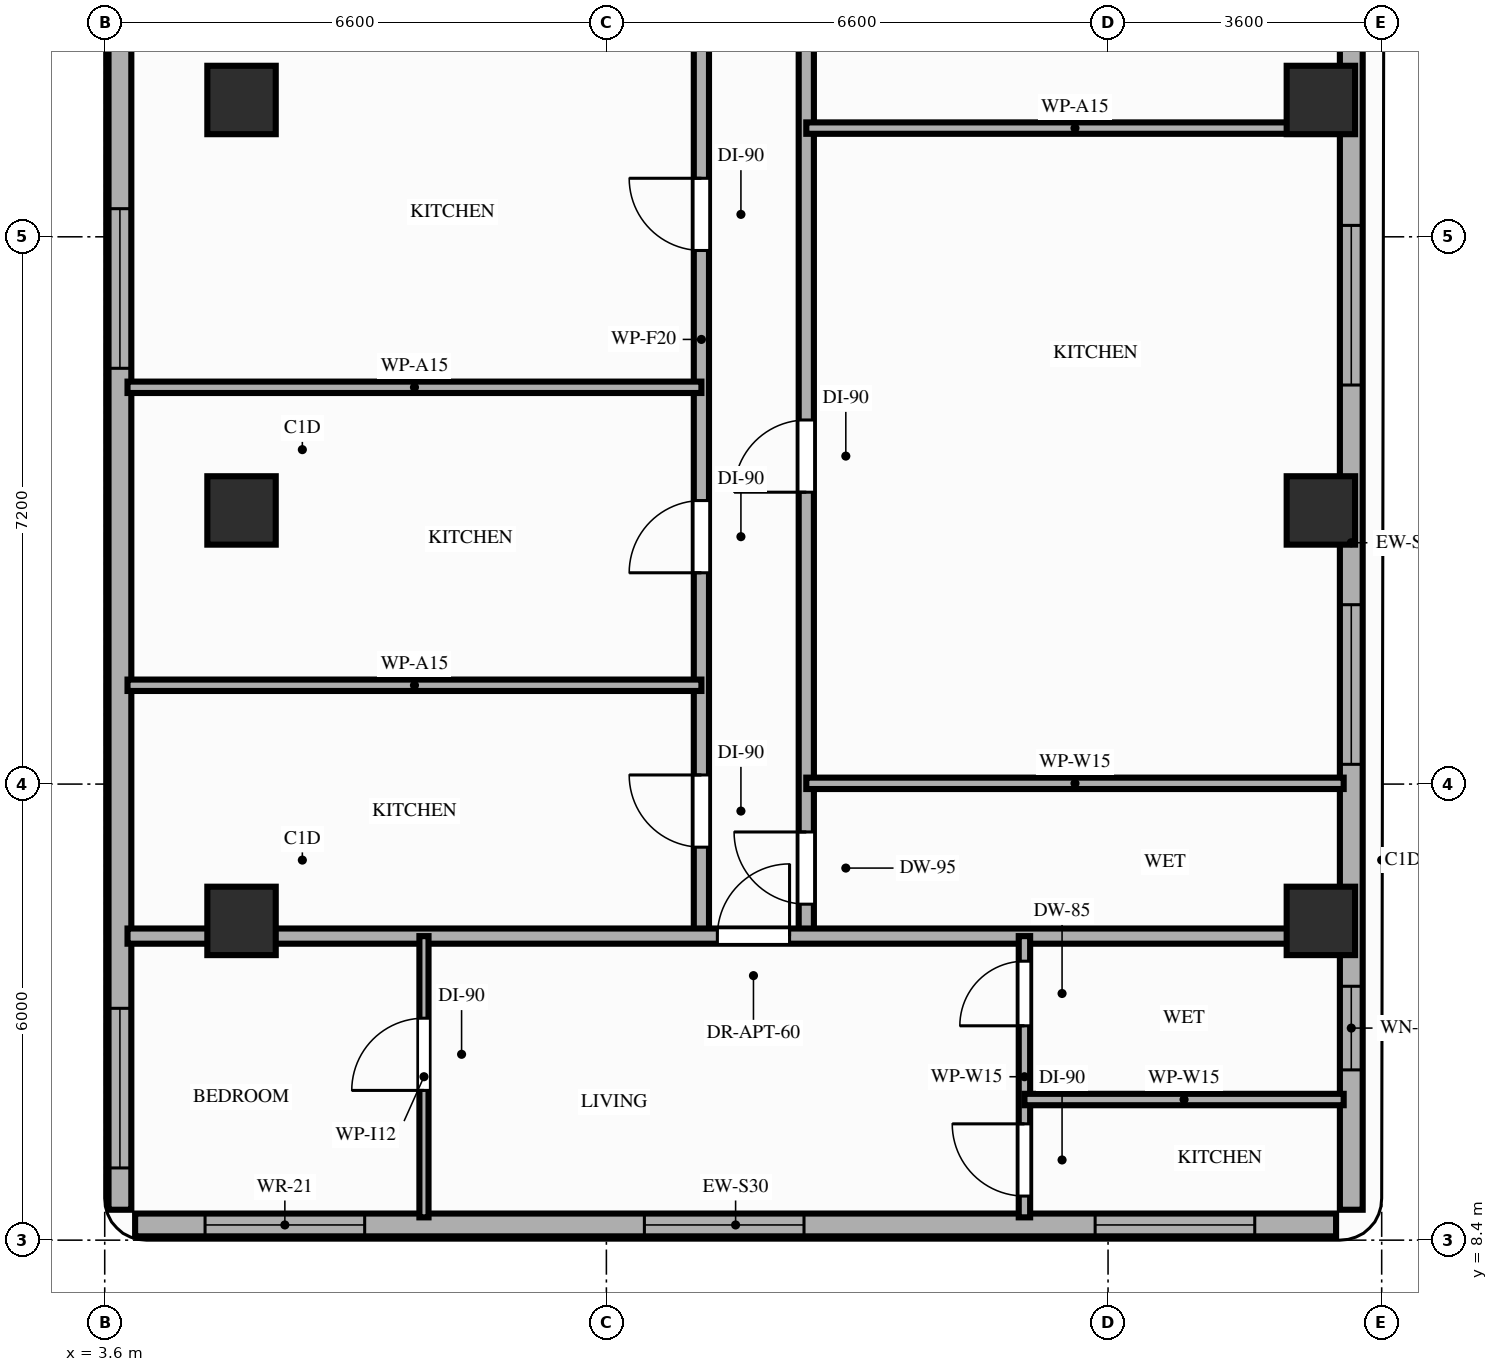
"""IFC4 building model, lengths in metres.
Left out: names, types, materials, properties, quantities, classifications, styles, units other than length and angle.
Written with IfcOpenShell. Run it as: python <this file> out.ifc"""

import sys

from ifc_helpers import new_model, si_unit, direction, frame, frame_2d, origin, origin_2d, place, context, subcontext, project, spatial, rectangle, extrude, element, fill, save


model = new_model("IFC4")
c1 = context("Model", 3, precision=1e-05, world=origin(), true_north=direction((0.0, 1.0)))
c2 = subcontext(c1, "Body", "Model", "MODEL_VIEW")
j1 = project(units=[si_unit("LENGTHUNIT", "METRE"), si_unit("PLANEANGLEUNIT", "RADIAN")], contexts=[c1])
p1 = place(None, origin())
s1 = spatial("IfcSite", under=j1, at=p1, CompositionType="ELEMENT")
p2 = place(p1, origin())
s2 = spatial("IfcBuilding", under=s1, at=p2, CompositionType="ELEMENT")
p3 = place(p2, frame((0.0, 0.0, 160.0)))
s3 = spatial("IfcBuildingStorey", under=s2, at=p3, CompositionType="ELEMENT", Elevation=160.0)
for number, where, z_axis, x_axis in (
    (1, (5.4, 12.6, 0.0), (0.0, 0.0, 1.0), (1.0, 0.0, 0.0)),
    (2, (19.6, 12.6, 0.0), (0.0, 0.0, 1.0), (1.0, 0.0, 0.0)),
    (3, (5.4, 18.0, 0.0), (0.0, 0.0, 1.0), (1.0, 0.0, 0.0)),
    (4, (19.6, 18.0, 0.0), (0.0, 0.0, 1.0), (1.0, 0.0, 0.0)),
    (5, (5.4, 23.4, 0.0), (0.0, 0.0, 1.0), (1.0, 0.0, 0.0)),
    (6, (19.6, 23.4, 0.0), (0.0, 0.0, 1.0), (1.0, 0.0, 0.0)),
):
    element("IfcColumn", number, at=place(p3, frame(where, z_axis=z_axis, x_axis=x_axis)), inside=s3, PredefinedType="COLUMN", context=c2, shape_type="SweptSolid", body=[
        extrude(rectangle(XDim=0.9, YDim=0.9, at=origin_2d()), origin(), (0.0, 0.0, 1.0), 3.2),
    ])
p4 = place(p3, frame((4.0, 8.6, 0.0), z_axis=(0.0, 0.0, 1.0), x_axis=(1.0, 0.0, 0.0)))
e7 = element("IfcWall", 7, at=p4, inside=s3, PredefinedType="STANDARD", context=c2, shape_type="SweptSolid", body=[
    extrude(rectangle(XDim=15.8, YDim=0.3, at=frame_2d((7.9, 0.0))), origin(), (0.0, 0.0, 1.0), 3.02),
])
p5 = place(p4, frame((0.92, 0.0, 0.85)))
e8 = element("IfcOpeningElement", 8, at=p5, cuts=e7, PredefinedType="OPENING", context=c2, shape_type="SweptSolid", body=[
    extrude(rectangle(XDim=2.1, YDim=1.8, at=frame_2d((1.05, 0.9))), frame((0.0, 0.16, 0.0), z_axis=(0.0, -1.0, 0.0), x_axis=(1.0, 0.0, 0.0)), (0.0, 0.0, 1.0), 0.32),
])
p6 = place(p4, frame((6.7, 0.0, 0.85)))
e9 = element("IfcOpeningElement", 9, at=p6, cuts=e7, PredefinedType="OPENING", context=c2, shape_type="SweptSolid", body=[
    extrude(rectangle(XDim=2.1, YDim=1.8, at=frame_2d((1.05, 0.9))), frame((0.0, 0.16, 0.0), z_axis=(0.0, -1.0, 0.0), x_axis=(1.0, 0.0, 0.0)), (0.0, 0.0, 1.0), 0.32),
])
p7 = place(p4, frame((12.63, 0.0, 0.85)))
e10 = element("IfcOpeningElement", 10, at=p7, cuts=e7, PredefinedType="OPENING", context=c2, shape_type="SweptSolid", body=[
    extrude(rectangle(XDim=2.1, YDim=1.8, at=frame_2d((1.05, 0.9))), frame((0.0, 0.16, 0.0), z_axis=(0.0, -1.0, 0.0), x_axis=(1.0, 0.0, 0.0)), (0.0, 0.0, 1.0), 0.32),
])
p8 = place(p3, frame((3.8, 42.1, 0.0), z_axis=(0.0, 0.0, 1.0), x_axis=(0.0, -1.0, 0.0)))
e11 = element("IfcWall", 11, at=p8, inside=s3, PredefinedType="STANDARD", context=c2, shape_type="SweptSolid", body=[
    extrude(rectangle(XDim=33.3, YDim=0.3, at=frame_2d((16.65, 0.0))), origin(), (0.0, 0.0, 1.0), 2.71),
])
p9 = place(p8, frame((15.3, 0.0, 0.0)))
e12 = element("IfcOpeningElement", 12, at=p9, cuts=e11, PredefinedType="OPENING", context=c2, shape_type="SweptSolid", body=[
    extrude(rectangle(XDim=1.4, YDim=2.1, at=frame_2d((0.7, 1.05))), frame((0.0, 0.16, 0.0), z_axis=(0.0, -1.0, 0.0), x_axis=(1.0, 0.0, 0.0)), (0.0, 0.0, 1.0), 0.32),
])
p10 = place(p8, frame((30.65, 0.0, 0.85)))
e13 = element("IfcOpeningElement", 13, at=p10, cuts=e11, PredefinedType="OPENING", context=c2, shape_type="SweptSolid", body=[
    extrude(rectangle(XDim=2.1, YDim=1.61, at=frame_2d((1.05, 0.805))), frame((0.0, 0.16, 0.0), z_axis=(0.0, -1.0, 0.0), x_axis=(1.0, 0.0, 0.0)), (0.0, 0.0, 1.0), 0.32),
])
p11 = place(p8, frame((20.13, 0.0, 0.85)))
e14 = element("IfcOpeningElement", 14, at=p11, cuts=e11, PredefinedType="OPENING", context=c2, shape_type="SweptSolid", body=[
    extrude(rectangle(XDim=2.1, YDim=1.61, at=frame_2d((1.05, 0.805))), frame((0.0, 0.16, 0.0), z_axis=(0.0, -1.0, 0.0), x_axis=(1.0, 0.0, 0.0)), (0.0, 0.0, 1.0), 0.32),
])
p12 = place(p8, frame((9.75, 0.0, 0.85)))
e15 = element("IfcOpeningElement", 15, at=p12, cuts=e11, PredefinedType="OPENING", context=c2, shape_type="SweptSolid", body=[
    extrude(rectangle(XDim=2.1, YDim=1.61, at=frame_2d((1.05, 0.805))), frame((0.0, 0.16, 0.0), z_axis=(0.0, -1.0, 0.0), x_axis=(1.0, 0.0, 0.0)), (0.0, 0.0, 1.0), 0.32),
])
p13 = place(p8, frame((3.65, 0.0, 0.85)))
e16 = element("IfcOpeningElement", 16, at=p13, cuts=e11, PredefinedType="OPENING", context=c2, shape_type="SweptSolid", body=[
    extrude(rectangle(XDim=2.1, YDim=1.61, at=frame_2d((1.05, 0.805))), frame((0.0, 0.16, 0.0), z_axis=(0.0, -1.0, 0.0), x_axis=(1.0, 0.0, 0.0)), (0.0, 0.0, 1.0), 0.32),
])
p14 = place(p3, frame((20.0, 8.8, 0.0), z_axis=(0.0, 0.0, 1.0), x_axis=(0.0, 1.0, 0.0)))
e17 = element("IfcWall", 17, at=p14, inside=s3, PredefinedType="STANDARD", context=c2, shape_type="SweptSolid", body=[
    extrude(rectangle(XDim=17.55, YDim=0.3, at=frame_2d((8.775, 0.0))), origin(), (0.0, 0.0, 1.0), 2.46),
])
p15 = place(p14, frame((1.84, 0.0, 0.85)))
e18 = element("IfcOpeningElement", 18, at=p15, cuts=e17, PredefinedType="OPENING", context=c2, shape_type="SweptSolid", body=[
    extrude(rectangle(XDim=1.1, YDim=1.36, at=frame_2d((0.55, 0.68))), frame((0.0, 0.16, 0.0), z_axis=(0.0, -1.0, 0.0), x_axis=(1.0, 0.0, 0.0)), (0.0, 0.0, 1.0), 0.32),
])
p16 = place(p14, frame((5.86, 0.0, 0.85)))
e19 = element("IfcOpeningElement", 19, at=p16, cuts=e17, PredefinedType="OPENING", context=c2, shape_type="SweptSolid", body=[
    extrude(rectangle(XDim=2.1, YDim=1.36, at=frame_2d((1.05, 0.68))), frame((0.0, 0.16, 0.0), z_axis=(0.0, -1.0, 0.0), x_axis=(1.0, 0.0, 0.0)), (0.0, 0.0, 1.0), 0.32),
])
p17 = place(p14, frame((10.85, 0.0, 0.85)))
e20 = element("IfcOpeningElement", 20, at=p17, cuts=e17, PredefinedType="OPENING", context=c2, shape_type="SweptSolid", body=[
    extrude(rectangle(XDim=2.1, YDim=1.36, at=frame_2d((1.05, 0.68))), frame((0.0, 0.16, 0.0), z_axis=(0.0, -1.0, 0.0), x_axis=(1.0, 0.0, 0.0)), (0.0, 0.0, 1.0), 0.32),
])
p18 = place(p3, frame((11.45, 12.4, 0.0), z_axis=(0.0, 0.0, 1.0), x_axis=(0.0, 1.0, 0.0)))
e21 = element("IfcWall", 21, at=p18, inside=s3, PredefinedType="PARTITIONING", context=c2, shape_type="SweptSolid", body=[
    extrude(rectangle(XDim=15.7, YDim=0.2, at=frame_2d((7.85, 0.0))), origin(), (0.0, 0.0, 1.0), 2.46),
])
p19 = place(p18, frame((1.17, 0.0, 0.0)))
e22 = element("IfcOpeningElement", 22, at=p19, cuts=e21, PredefinedType="OPENING", context=c2, shape_type="SweptSolid", body=[
    extrude(rectangle(XDim=0.95, YDim=2.15, at=frame_2d((0.475, 1.075))), frame((0.0, 0.11, 0.0), z_axis=(0.0, -1.0, 0.0), x_axis=(1.0, 0.0, 0.0)), (0.0, 0.0, 1.0), 0.22),
])
p20 = place(p18, frame((4.78, 0.0, 0.0)))
e23 = element("IfcOpeningElement", 23, at=p20, cuts=e21, PredefinedType="OPENING", context=c2, shape_type="SweptSolid", body=[
    extrude(rectangle(XDim=0.95, YDim=2.15, at=frame_2d((0.475, 1.075))), frame((0.0, 0.11, 0.0), z_axis=(0.0, -1.0, 0.0), x_axis=(1.0, 0.0, 0.0)), (0.0, 0.0, 1.0), 0.22),
])
p21 = place(p18, frame((9.02, 0.0, 0.0)))
e24 = element("IfcOpeningElement", 24, at=p21, cuts=e21, PredefinedType="OPENING", context=c2, shape_type="SweptSolid", body=[
    extrude(rectangle(XDim=0.95, YDim=2.15, at=frame_2d((0.475, 1.075))), frame((0.0, 0.11, 0.0), z_axis=(0.0, -1.0, 0.0), x_axis=(1.0, 0.0, 0.0)), (0.0, 0.0, 1.0), 0.22),
])
p22 = place(p18, frame((13.26, 0.0, 0.0)))
e25 = element("IfcOpeningElement", 25, at=p22, cuts=e21, PredefinedType="OPENING", context=c2, shape_type="SweptSolid", body=[
    extrude(rectangle(XDim=0.95, YDim=2.15, at=frame_2d((0.475, 1.075))), frame((0.0, 0.11, 0.0), z_axis=(0.0, -1.0, 0.0), x_axis=(1.0, 0.0, 0.0)), (0.0, 0.0, 1.0), 0.22),
])
p23 = place(p3, frame((12.83, 12.4, 0.0), z_axis=(0.0, 0.0, 1.0), x_axis=(0.0, 1.0, 0.0)))
e26 = element("IfcWall", 26, at=p23, inside=s3, PredefinedType="PARTITIONING", context=c2, shape_type="SweptSolid", body=[
    extrude(rectangle(XDim=15.7, YDim=0.2, at=frame_2d((7.85, 0.0))), origin(), (0.0, 0.0, 1.0), 2.46),
])
p24 = place(p23, frame((0.42, 0.0, 0.0)))
e27 = element("IfcOpeningElement", 27, at=p24, cuts=e26, PredefinedType="OPENING", context=c2, shape_type="SweptSolid", body=[
    extrude(rectangle(XDim=0.95, YDim=2.1, at=frame_2d((0.475, 1.05))), frame((0.0, 0.11, 0.0), z_axis=(0.0, -1.0, 0.0), x_axis=(1.0, 0.0, 0.0)), (0.0, 0.0, 1.0), 0.22),
])
p25 = place(p23, frame((5.84, 0.0, 0.0)))
e28 = element("IfcOpeningElement", 28, at=p25, cuts=e26, PredefinedType="OPENING", context=c2, shape_type="SweptSolid", body=[
    extrude(rectangle(XDim=0.95, YDim=2.15, at=frame_2d((0.475, 1.075))), frame((0.0, 0.11, 0.0), z_axis=(0.0, -1.0, 0.0), x_axis=(1.0, 0.0, 0.0)), (0.0, 0.0, 1.0), 0.22),
])
p26 = place(p23, frame((12.69, 0.0, 0.0)))
e29 = element("IfcOpeningElement", 29, at=p26, cuts=e26, PredefinedType="OPENING", context=c2, shape_type="SweptSolid", body=[
    extrude(rectangle(XDim=0.95, YDim=2.15, at=frame_2d((0.475, 1.075))), frame((0.0, 0.11, 0.0), z_axis=(0.0, -1.0, 0.0), x_axis=(1.0, 0.0, 0.0)), (0.0, 0.0, 1.0), 0.22),
])
p27 = place(p3, frame((3.9, 12.4, 0.0), z_axis=(0.0, 0.0, 1.0), x_axis=(1.0, 0.0, 0.0)))
e30 = element("IfcWall", 30, at=p27, inside=s3, PredefinedType="PARTITIONING", context=c2, shape_type="SweptSolid", body=[
    extrude(rectangle(XDim=16.0, YDim=0.2, at=frame_2d((8.0, 0.0))), origin(), (0.0, 0.0, 1.0), 2.46),
])
p28 = place(p27, frame((7.76, 0.0, 0.0)))
e31 = element("IfcOpeningElement", 31, at=p28, cuts=e30, PredefinedType="OPENING", context=c2, shape_type="SweptSolid", body=[
    extrude(rectangle(XDim=0.95, YDim=2.15, at=frame_2d((0.475, 1.075))), frame((0.0, 0.11, 0.0), z_axis=(0.0, -1.0, 0.0), x_axis=(1.0, 0.0, 0.0)), (0.0, 0.0, 1.0), 0.22),
])
p29 = place(p3, frame((7.8, 8.7, 0.0), z_axis=(0.0, 0.0, 1.0), x_axis=(0.0, 1.0, 0.0)))
e32 = element("IfcWall", 32, at=p29, inside=s3, PredefinedType="PARTITIONING", context=c2, shape_type="SweptSolid", body=[
    extrude(rectangle(XDim=3.7, YDim=0.12, at=frame_2d((1.85, 0.0))), origin(), (0.0, 0.0, 1.0), 2.46),
])
p30 = place(p29, frame((1.67, 0.0, 0.0)))
e33 = element("IfcOpeningElement", 33, at=p30, cuts=e32, PredefinedType="OPENING", context=c2, shape_type="SweptSolid", body=[
    extrude(rectangle(XDim=0.95, YDim=2.15, at=frame_2d((0.475, 1.075))), frame((0.0, 0.07, 0.0), z_axis=(0.0, -1.0, 0.0), x_axis=(1.0, 0.0, 0.0)), (0.0, 0.0, 1.0), 0.14),
])
p31 = place(p3, frame((15.7, 8.7, 0.0), z_axis=(0.0, 0.0, 1.0), x_axis=(0.0, 1.0, 0.0)))
e34 = element("IfcWall", 34, at=p31, inside=s3, PredefinedType="PARTITIONING", context=c2, shape_type="SweptSolid", body=[
    extrude(rectangle(XDim=3.7, YDim=0.15, at=frame_2d((1.85, 0.0))), origin(), (0.0, 0.0, 1.0), 2.46),
])
p32 = place(p31, frame((0.28, 0.0, 0.0)))
e35 = element("IfcOpeningElement", 35, at=p32, cuts=e34, PredefinedType="OPENING", context=c2, shape_type="SweptSolid", body=[
    extrude(rectangle(XDim=0.95, YDim=2.15, at=frame_2d((0.475, 1.075))), frame((0.0, 0.085, 0.0), z_axis=(0.0, -1.0, 0.0), x_axis=(1.0, 0.0, 0.0)), (0.0, 0.0, 1.0), 0.17),
])
p33 = place(p31, frame((2.52, 0.0, 0.0)))
e36 = element("IfcOpeningElement", 36, at=p33, cuts=e34, PredefinedType="OPENING", context=c2, shape_type="SweptSolid", body=[
    extrude(rectangle(XDim=0.85, YDim=2.1, at=frame_2d((0.425, 1.05))), frame((0.0, 0.085, 0.0), z_axis=(0.0, -1.0, 0.0), x_axis=(1.0, 0.0, 0.0)), (0.0, 0.0, 1.0), 0.17),
])
p34 = place(p3, frame((15.7, 10.25, 0.0), z_axis=(0.0, 0.0, 1.0), x_axis=(1.0, 0.0, 0.0)))
e37 = element("IfcWall", 37, at=p34, inside=s3, PredefinedType="PARTITIONING", context=c2, shape_type="SweptSolid", body=[
    extrude(rectangle(XDim=4.2, YDim=0.15, at=frame_2d((2.1, 0.0))), origin(), (0.0, 0.0, 1.0), 3.02),
])
for number, where, z_axis, x_axis in (
    (38, (3.9, 15.7, 0.0), (0.0, 0.0, 1.0), (1.0, 0.0, 0.0)),
    (39, (3.9, 19.62, 0.0), (0.0, 0.0, 1.0), (1.0, 0.0, 0.0)),
):
    element("IfcWall", number, at=place(p3, frame(where, z_axis=z_axis, x_axis=x_axis)), inside=s3, PredefinedType="PARTITIONING", context=c2, shape_type="SweptSolid", body=[
        extrude(rectangle(XDim=7.55, YDim=0.15, at=frame_2d((3.775, 0.0))), origin(), (0.0, 0.0, 1.0), 2.46),
    ])
for number, where, z_axis, x_axis in (
    (40, (12.83, 14.41, 0.0), (0.0, 0.0, 1.0), (1.0, 0.0, 0.0)),
    (41, (12.83, 23.03, 0.0), (0.0, 0.0, 1.0), (1.0, 0.0, 0.0)),
):
    element("IfcWall", number, at=place(p3, frame(where, z_axis=z_axis, x_axis=x_axis)), inside=s3, PredefinedType="PARTITIONING", context=c2, shape_type="SweptSolid", body=[
        extrude(rectangle(XDim=7.07, YDim=0.15, at=frame_2d((3.535, 0.0))), origin(), (0.0, 0.0, 1.0), 2.46),
    ])
p35 = place(p5, origin())
e42 = element("IfcWindow", 42, at=p35, inside=s3, PartitioningType="SINGLE_PANEL", PredefinedType="WINDOW", context=c2, shape_type="SweptSolid", body=[
    extrude(rectangle(XDim=2.1, YDim=1.8, at=frame_2d((1.05, 0.9))), frame((0.0, 0.03, 0.0), z_axis=(0.0, -1.0, 0.0), x_axis=(1.0, 0.0, 0.0)), (0.0, 0.0, 1.0), 0.06),
])
fill(e8, e42)
p36 = place(p6, origin())
e43 = element("IfcWindow", 43, at=p36, inside=s3, PartitioningType="SINGLE_PANEL", PredefinedType="WINDOW", context=c2, shape_type="SweptSolid", body=[
    extrude(rectangle(XDim=2.1, YDim=1.8, at=frame_2d((1.05, 0.9))), frame((0.0, 0.03, 0.0), z_axis=(0.0, -1.0, 0.0), x_axis=(1.0, 0.0, 0.0)), (0.0, 0.0, 1.0), 0.06),
])
fill(e9, e43)
p37 = place(p7, origin())
e44 = element("IfcWindow", 44, at=p37, inside=s3, PartitioningType="SINGLE_PANEL", PredefinedType="WINDOW", context=c2, shape_type="SweptSolid", body=[
    extrude(rectangle(XDim=2.1, YDim=1.8, at=frame_2d((1.05, 0.9))), frame((0.0, 0.03, 0.0), z_axis=(0.0, -1.0, 0.0), x_axis=(1.0, 0.0, 0.0)), (0.0, 0.0, 1.0), 0.06),
])
fill(e10, e44)
p38 = place(p15, origin())
e45 = element("IfcWindow", 45, at=p38, inside=s3, PartitioningType="SINGLE_PANEL", PredefinedType="WINDOW", context=c2, shape_type="SweptSolid", body=[
    extrude(rectangle(XDim=1.1, YDim=1.36, at=frame_2d((0.55, 0.68))), frame((0.0, 0.03, 0.0), z_axis=(0.0, -1.0, 0.0), x_axis=(1.0, 0.0, 0.0)), (0.0, 0.0, 1.0), 0.06),
])
fill(e18, e45)
p39 = place(p10, origin())
e46 = element("IfcWindow", 46, at=p39, inside=s3, PartitioningType="SINGLE_PANEL", PredefinedType="WINDOW", context=c2, shape_type="SweptSolid", body=[
    extrude(rectangle(XDim=2.1, YDim=1.61, at=frame_2d((1.05, 0.805))), frame((0.0, 0.03, 0.0), z_axis=(0.0, -1.0, 0.0), x_axis=(1.0, 0.0, 0.0)), (0.0, 0.0, 1.0), 0.06),
])
fill(e13, e46)
p40 = place(p11, origin())
e47 = element("IfcWindow", 47, at=p40, inside=s3, PartitioningType="SINGLE_PANEL", PredefinedType="WINDOW", context=c2, shape_type="SweptSolid", body=[
    extrude(rectangle(XDim=2.1, YDim=1.61, at=frame_2d((1.05, 0.805))), frame((0.0, 0.03, 0.0), z_axis=(0.0, -1.0, 0.0), x_axis=(1.0, 0.0, 0.0)), (0.0, 0.0, 1.0), 0.06),
])
fill(e14, e47)
p41 = place(p16, origin())
e48 = element("IfcWindow", 48, at=p41, inside=s3, PartitioningType="SINGLE_PANEL", PredefinedType="WINDOW", context=c2, shape_type="SweptSolid", body=[
    extrude(rectangle(XDim=2.1, YDim=1.36, at=frame_2d((1.05, 0.68))), frame((0.0, 0.03, 0.0), z_axis=(0.0, -1.0, 0.0), x_axis=(1.0, 0.0, 0.0)), (0.0, 0.0, 1.0), 0.06),
])
fill(e19, e48)
p42 = place(p17, origin())
e49 = element("IfcWindow", 49, at=p42, inside=s3, PartitioningType="SINGLE_PANEL", PredefinedType="WINDOW", context=c2, shape_type="SweptSolid", body=[
    extrude(rectangle(XDim=2.1, YDim=1.36, at=frame_2d((1.05, 0.68))), frame((0.0, 0.03, 0.0), z_axis=(0.0, -1.0, 0.0), x_axis=(1.0, 0.0, 0.0)), (0.0, 0.0, 1.0), 0.06),
])
fill(e20, e49)
p43 = place(p28, origin())
e50 = element("IfcDoor", 50, at=p43, inside=s3, OperationType="SINGLE_SWING_RIGHT", PredefinedType="DOOR", context=c2, shape_type="SweptSolid", body=[
    extrude(rectangle(XDim=0.95, YDim=2.15, at=frame_2d((0.475, 1.075))), frame((0.0, 0.025, 0.0), z_axis=(0.0, -1.0, 0.0), x_axis=(1.0, 0.0, 0.0)), (0.0, 0.0, 1.0), 0.05),
])
fill(e31, e50)
p44 = place(p30, origin())
e51 = element("IfcDoor", 51, at=p44, inside=s3, OperationType="SINGLE_SWING_LEFT", PredefinedType="DOOR", context=c2, shape_type="SweptSolid", body=[
    extrude(rectangle(XDim=0.95, YDim=2.15, at=frame_2d((0.475, 1.075))), frame((0.0, 0.025, 0.0), z_axis=(0.0, -1.0, 0.0), x_axis=(1.0, 0.0, 0.0)), (0.0, 0.0, 1.0), 0.05),
])
fill(e33, e51)
p45 = place(p32, origin())
e52 = element("IfcDoor", 52, at=p45, inside=s3, OperationType="SINGLE_SWING_RIGHT", PredefinedType="DOOR", context=c2, shape_type="SweptSolid", body=[
    extrude(rectangle(XDim=0.95, YDim=2.15, at=frame_2d((0.475, 1.075))), frame((0.0, 0.025, 0.0), z_axis=(0.0, -1.0, 0.0), x_axis=(1.0, 0.0, 0.0)), (0.0, 0.0, 1.0), 0.05),
])
fill(e35, e52)
p46 = place(p33, origin())
e53 = element("IfcDoor", 53, at=p46, inside=s3, OperationType="SINGLE_SWING_LEFT", PredefinedType="DOOR", context=c2, shape_type="SweptSolid", body=[
    extrude(rectangle(XDim=0.85, YDim=2.1, at=frame_2d((0.425, 1.05))), frame((0.0, 0.025, 0.0), z_axis=(0.0, -1.0, 0.0), x_axis=(1.0, 0.0, 0.0)), (0.0, 0.0, 1.0), 0.05),
])
fill(e36, e53)
p47 = place(p19, origin())
e54 = element("IfcDoor", 54, at=p47, inside=s3, OperationType="SINGLE_SWING_RIGHT", PredefinedType="DOOR", context=c2, shape_type="SweptSolid", body=[
    extrude(rectangle(XDim=0.95, YDim=2.15, at=frame_2d((0.475, 1.075))), frame((0.0, 0.025, 0.0), z_axis=(0.0, -1.0, 0.0), x_axis=(1.0, 0.0, 0.0)), (0.0, 0.0, 1.0), 0.05),
])
fill(e22, e54)
p48 = place(p20, origin())
e55 = element("IfcDoor", 55, at=p48, inside=s3, OperationType="SINGLE_SWING_LEFT", PredefinedType="DOOR", context=c2, shape_type="SweptSolid", body=[
    extrude(rectangle(XDim=0.95, YDim=2.15, at=frame_2d((0.475, 1.075))), frame((0.0, 0.025, 0.0), z_axis=(0.0, -1.0, 0.0), x_axis=(1.0, 0.0, 0.0)), (0.0, 0.0, 1.0), 0.05),
])
fill(e23, e55)
p49 = place(p21, origin())
e56 = element("IfcDoor", 56, at=p49, inside=s3, OperationType="SINGLE_SWING_RIGHT", PredefinedType="DOOR", context=c2, shape_type="SweptSolid", body=[
    extrude(rectangle(XDim=0.95, YDim=2.15, at=frame_2d((0.475, 1.075))), frame((0.0, 0.025, 0.0), z_axis=(0.0, -1.0, 0.0), x_axis=(1.0, 0.0, 0.0)), (0.0, 0.0, 1.0), 0.05),
])
fill(e24, e56)
p50 = place(p24, origin())
e57 = element("IfcDoor", 57, at=p50, inside=s3, OperationType="SINGLE_SWING_RIGHT", PredefinedType="DOOR", context=c2, shape_type="SweptSolid", body=[
    extrude(rectangle(XDim=0.95, YDim=2.1, at=frame_2d((0.475, 1.05))), frame((0.0, 0.025, 0.0), z_axis=(0.0, -1.0, 0.0), x_axis=(1.0, 0.0, 0.0)), (0.0, 0.0, 1.0), 0.05),
])
fill(e27, e57)
p51 = place(p25, origin())
e58 = element("IfcDoor", 58, at=p51, inside=s3, OperationType="SINGLE_SWING_LEFT", PredefinedType="DOOR", context=c2, shape_type="SweptSolid", body=[
    extrude(rectangle(XDim=0.95, YDim=2.15, at=frame_2d((0.475, 1.075))), frame((0.0, 0.025, 0.0), z_axis=(0.0, -1.0, 0.0), x_axis=(1.0, 0.0, 0.0)), (0.0, 0.0, 1.0), 0.05),
])
fill(e28, e58)
save(model, sys.argv[1])
